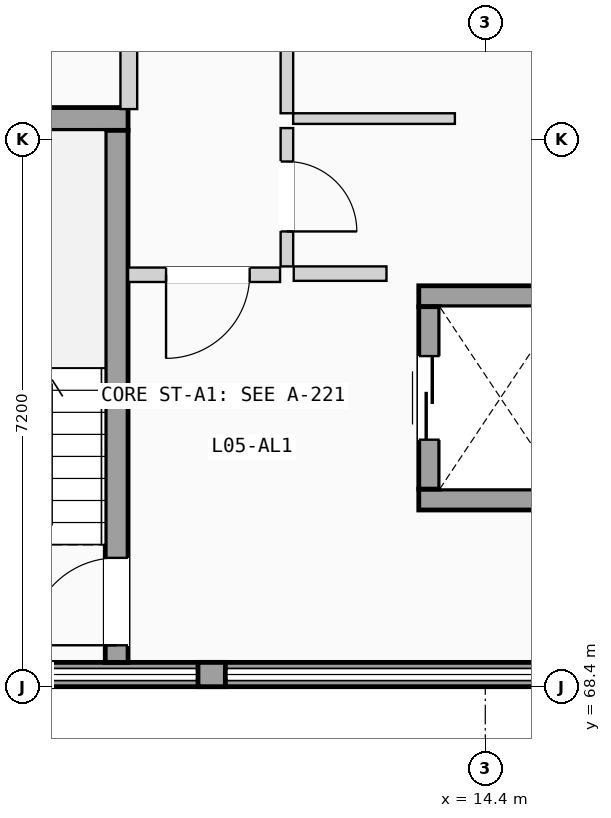
"""IFC4 building model, lengths in metres.
Left out: names, types, materials, properties, quantities, classifications, styles, units other than length and angle.
Written with IfcOpenShell. Run it as: python <this file> out.ifc"""

import sys

from ifc_helpers import new_model, si_unit, direction, frame, frame_2d, origin, place, context, subcontext, project, spatial, rectangle, extrude, element, fill, save


model = new_model("IFC4")
c1 = context("Model", 3, precision=1e-05, world=origin(), true_north=direction((0.0, 1.0)))
c2 = subcontext(c1, "Body", "Model", "MODEL_VIEW")
j1 = project(units=[si_unit("LENGTHUNIT", "METRE"), si_unit("PLANEANGLEUNIT", "RADIAN")], contexts=[c1])
p1 = place(None, origin())
s1 = spatial("IfcSite", under=j1, at=p1, CompositionType="ELEMENT")
p2 = place(p1, origin())
s2 = spatial("IfcBuilding", under=s1, at=p2, CompositionType="ELEMENT")
p3 = place(p2, frame((0.0, 0.0, 18.375)))
s3 = spatial("IfcBuildingStorey", under=s2, at=p3, CompositionType="ELEMENT", Elevation=18.375)
p4 = place(p3, frame((0.0, 68.56, 0.0), z_axis=(0.0, 0.0, 1.0), x_axis=(1.0, 0.0, 0.0)))
e1 = element("IfcWall", 1, at=p4, inside=s3, PredefinedType="SOLIDWALL", context=c2, shape_type="SweptSolid", body=[
    extrude(rectangle(XDim=21.6, YDim=0.32, at=frame_2d((10.8, 0.0))), origin(), (0.0, 0.0, 1.0), 1.11),
])
p5 = place(p3, frame((10.62, 68.56, 1.11), z_axis=(0.0, 0.0, 1.0), x_axis=(1.0, 0.0, 0.0)))
e2 = element("IfcWall", 2, at=p5, inside=s3, PredefinedType="SOLIDWALL", context=c2, shape_type="SweptSolid", body=[
    extrude(rectangle(XDim=0.36, YDim=0.32, at=frame_2d((0.18, 0.0))), origin(), (0.0, 0.0, 1.0), 1.78),
])
p6 = place(p3, frame((5.75, 75.87, 0.0), z_axis=(0.0, 0.0, 1.0), x_axis=(1.0, 0.0, 0.0)))
e3 = element("IfcWall", 3, at=p6, inside=s3, PredefinedType="SHEAR", context=c2, shape_type="SweptSolid", body=[
    extrude(rectangle(XDim=3.95, YDim=0.3, at=frame_2d((1.975, 0.0))), origin(), (0.0, 0.0, 1.0), 2.89),
])
p7 = place(p3, frame((9.55, 68.72, 0.0), z_axis=(0.0, 0.0, 1.0), x_axis=(0.0, 1.0, 0.0)))
e4 = element("IfcWall", 4, at=p7, inside=s3, PredefinedType="SHEAR", context=c2, shape_type="SweptSolid", body=[
    extrude(rectangle(XDim=7.0, YDim=0.3, at=frame_2d((3.5, 0.0))), origin(), (0.0, 0.0, 1.0), 2.89),
])
p8 = place(p7, frame((0.225, 0.0, 0.0)))
e5 = element("IfcOpeningElement", 5, at=p8, cuts=e4, PredefinedType="OPENING", context=c2, shape_type="SweptSolid", body=[
    extrude(rectangle(XDim=1.15, YDim=2.12, at=frame_2d((0.575, 1.06))), frame((0.0, 0.16, 0.0), z_axis=(0.0, -1.0, 0.0), x_axis=(1.0, 0.0, 0.0)), (0.0, 0.0, 1.0), 0.32),
])
for number, where, z_axis, x_axis in (
    (6, (13.525, 70.863, 0.0), (0.0, 0.0, 1.0), (1.0, 0.0, 0.0)),
    (7, (13.525, 73.538, 0.0), (0.0, 0.0, 1.0), (1.0, 0.0, 0.0)),
):
    element("IfcWall", number, at=place(p3, frame(where, z_axis=z_axis, x_axis=x_axis)), inside=s3, PredefinedType="SHEAR", context=c2, shape_type="SweptSolid", body=[
        extrude(rectangle(XDim=2.15, YDim=0.275, at=frame_2d((1.075, 0.0))), origin(), (0.0, 0.0, 1.0), 2.89),
    ])
p9 = place(p3, frame((13.663, 71.0, 0.0), z_axis=(0.0, 0.0, 1.0), x_axis=(0.0, 1.0, 0.0)))
e8 = element("IfcWall", 8, at=p9, inside=s3, PredefinedType="SHEAR", context=c2, shape_type="SweptSolid", body=[
    extrude(rectangle(XDim=2.4, YDim=0.275, at=frame_2d((1.2, 0.0))), origin(), (0.0, 0.0, 1.0), 2.89),
])
p10 = place(p9, frame((0.65, 0.0, 0.0)))
e9 = element("IfcOpeningElement", 9, at=p10, cuts=e8, PredefinedType="OPENING", context=c2, shape_type="SweptSolid", body=[
    extrude(rectangle(XDim=1.1, YDim=2.15, at=frame_2d((0.55, 1.075))), frame((0.0, 0.147, 0.0), z_axis=(0.0, -1.0, 0.0), x_axis=(1.0, 0.0, 0.0)), (0.0, 0.0, 1.0), 0.295),
])
p11 = place(p3, frame((11.88, 73.835, 0.0), z_axis=(0.0, 0.0, 1.0), x_axis=(1.0, 0.0, 0.0)))
e10 = element("IfcWall", 10, at=p11, inside=s3, PredefinedType="PARTITIONING", context=c2, shape_type="SweptSolid", body=[
    extrude(rectangle(XDim=1.22, YDim=0.19, at=frame_2d((0.61, 0.0))), origin(), (0.0, 0.0, 1.0), 2.87),
])
p12 = place(p3, frame((9.7, 73.82, 0.0), z_axis=(0.0, 0.0, 1.0), x_axis=(1.0, 0.0, 0.0)))
e11 = element("IfcWall", 11, at=p12, inside=s3, PredefinedType="PARTITIONING", context=c2, shape_type="SweptSolid", body=[
    extrude(rectangle(XDim=2.0, YDim=0.19, at=frame_2d((1.0, 0.0))), origin(), (0.0, 0.0, 1.0), 2.87),
])
p13 = place(p12, frame((0.5, 0.0, 0.0)))
e12 = element("IfcOpeningElement", 12, at=p13, cuts=e11, PredefinedType="OPENING", context=c2, shape_type="SweptSolid", body=[
    extrude(rectangle(XDim=1.1, YDim=2.12, at=frame_2d((0.55, 1.06))), frame((0.0, 0.105, 0.0), z_axis=(0.0, -1.0, 0.0), x_axis=(1.0, 0.0, 0.0)), (0.0, 0.0, 1.0), 0.21),
])
p14 = place(p3, frame((11.79, 73.93, 0.0), z_axis=(0.0, 0.0, 1.0), x_axis=(0.0, 1.0, 0.0)))
e13 = element("IfcWall", 13, at=p14, inside=s3, PredefinedType="PARTITIONING", context=c2, shape_type="SweptSolid", body=[
    extrude(rectangle(XDim=1.82, YDim=0.165, at=frame_2d((0.91, 0.0))), origin(), (0.0, 0.0, 1.0), 2.87),
])
p15 = place(p14, frame((0.46, 0.0, 0.0)))
e14 = element("IfcOpeningElement", 14, at=p15, cuts=e13, PredefinedType="OPENING", context=c2, shape_type="SweptSolid", body=[
    extrude(rectangle(XDim=0.92, YDim=2.04, at=frame_2d((0.46, 1.02))), frame((0.0, 0.093, 0.0), z_axis=(0.0, -1.0, 0.0), x_axis=(1.0, 0.0, 0.0)), (0.0, 0.0, 1.0), 0.185),
])
p16 = place(p3, frame((11.872, 75.875, 0.0), z_axis=(0.0, 0.0, 1.0), x_axis=(1.0, 0.0, 0.0)))
e15 = element("IfcWall", 15, at=p16, inside=s3, PredefinedType="PARTITIONING", context=c2, shape_type="SweptSolid", body=[
    extrude(rectangle(XDim=2.128, YDim=0.14, at=frame_2d((1.064, 0.0))), origin(), (0.0, 0.0, 1.0), 2.87),
])
p17 = place(p3, frame((9.71, 76.0, 0.0), z_axis=(0.0, 0.0, 1.0), x_axis=(0.0, 1.0, 0.0)))
e16 = element("IfcWall", 16, at=p17, inside=s3, PredefinedType="PLUMBINGWALL", context=c2, shape_type="SweptSolid", body=[
    extrude(rectangle(XDim=4.912, YDim=0.22, at=frame_2d((2.456, 0.0))), origin(), (0.0, 0.0, 1.0), 2.87),
])
p18 = place(p3, frame((11.79, 75.945, 0.0), z_axis=(0.0, 0.0, 1.0), x_axis=(0.0, 1.0, 0.0)))
e17 = element("IfcWall", 17, at=p18, inside=s3, PredefinedType="PARTITIONING", context=c2, shape_type="SweptSolid", body=[
    extrude(rectangle(XDim=8.016, YDim=0.165, at=frame_2d((4.008, 0.0))), origin(), (0.0, 0.0, 1.0), 2.87),
])
p19 = place(p18, frame((3.546, 0.0, 0.0)))
e18 = element("IfcOpeningElement", 18, at=p19, cuts=e17, PredefinedType="OPENING", context=c2, shape_type="SweptSolid", body=[
    extrude(rectangle(XDim=0.98, YDim=2.08, at=frame_2d((0.49, 1.04))), frame((0.0, 0.093, 0.0), z_axis=(0.0, -1.0, 0.0), x_axis=(1.0, 0.0, 0.0)), (0.0, 0.0, 1.0), 0.185),
])
p20 = place(p8, origin())
e19 = element("IfcDoor", 19, at=p20, inside=s3, OperationType="SINGLE_SWING_LEFT", PredefinedType="DOOR", context=c2, shape_type="SweptSolid", body=[
    extrude(rectangle(XDim=1.15, YDim=2.12, at=frame_2d((0.575, 1.06))), frame((0.0, 0.025, 0.0), z_axis=(0.0, -1.0, 0.0), x_axis=(1.0, 0.0, 0.0)), (0.0, 0.0, 1.0), 0.05),
])
fill(e5, e19)
p21 = place(p10, origin())
e20 = element("IfcDoor", 20, at=p21, inside=s3, OperationType="SLIDING_TO_LEFT", PredefinedType="DOOR", context=c2, shape_type="SweptSolid", body=[
    extrude(rectangle(XDim=1.1, YDim=2.15, at=frame_2d((0.55, 1.075))), frame((0.0, 0.025, 0.0), z_axis=(0.0, -1.0, 0.0), x_axis=(1.0, 0.0, 0.0)), (0.0, 0.0, 1.0), 0.05),
])
fill(e9, e20)
p22 = place(p13, frame((1.1, 0.0, 0.0), z_axis=(0.0, 0.0, 1.0), x_axis=(-1.0, 0.0, 0.0)))
e21 = element("IfcDoor", 21, at=p22, inside=s3, OperationType="SINGLE_SWING_LEFT", PredefinedType="DOOR", context=c2, shape_type="SweptSolid", body=[
    extrude(rectangle(XDim=1.1, YDim=2.12, at=frame_2d((0.55, 1.06))), frame((0.0, 0.025, 0.0), z_axis=(0.0, -1.0, 0.0), x_axis=(1.0, 0.0, 0.0)), (0.0, 0.0, 1.0), 0.05),
])
fill(e12, e21)
p23 = place(p15, frame((0.92, 0.0, 0.0), z_axis=(0.0, 0.0, 1.0), x_axis=(-1.0, 0.0, 0.0)))
e22 = element("IfcDoor", 22, at=p23, inside=s3, OperationType="SINGLE_SWING_LEFT", PredefinedType="DOOR", context=c2, shape_type="SweptSolid", body=[
    extrude(rectangle(XDim=0.92, YDim=2.04, at=frame_2d((0.46, 1.02))), frame((0.0, 0.025, 0.0), z_axis=(0.0, -1.0, 0.0), x_axis=(1.0, 0.0, 0.0)), (0.0, 0.0, 1.0), 0.05),
])
fill(e14, e22)
save(model, sys.argv[1])
